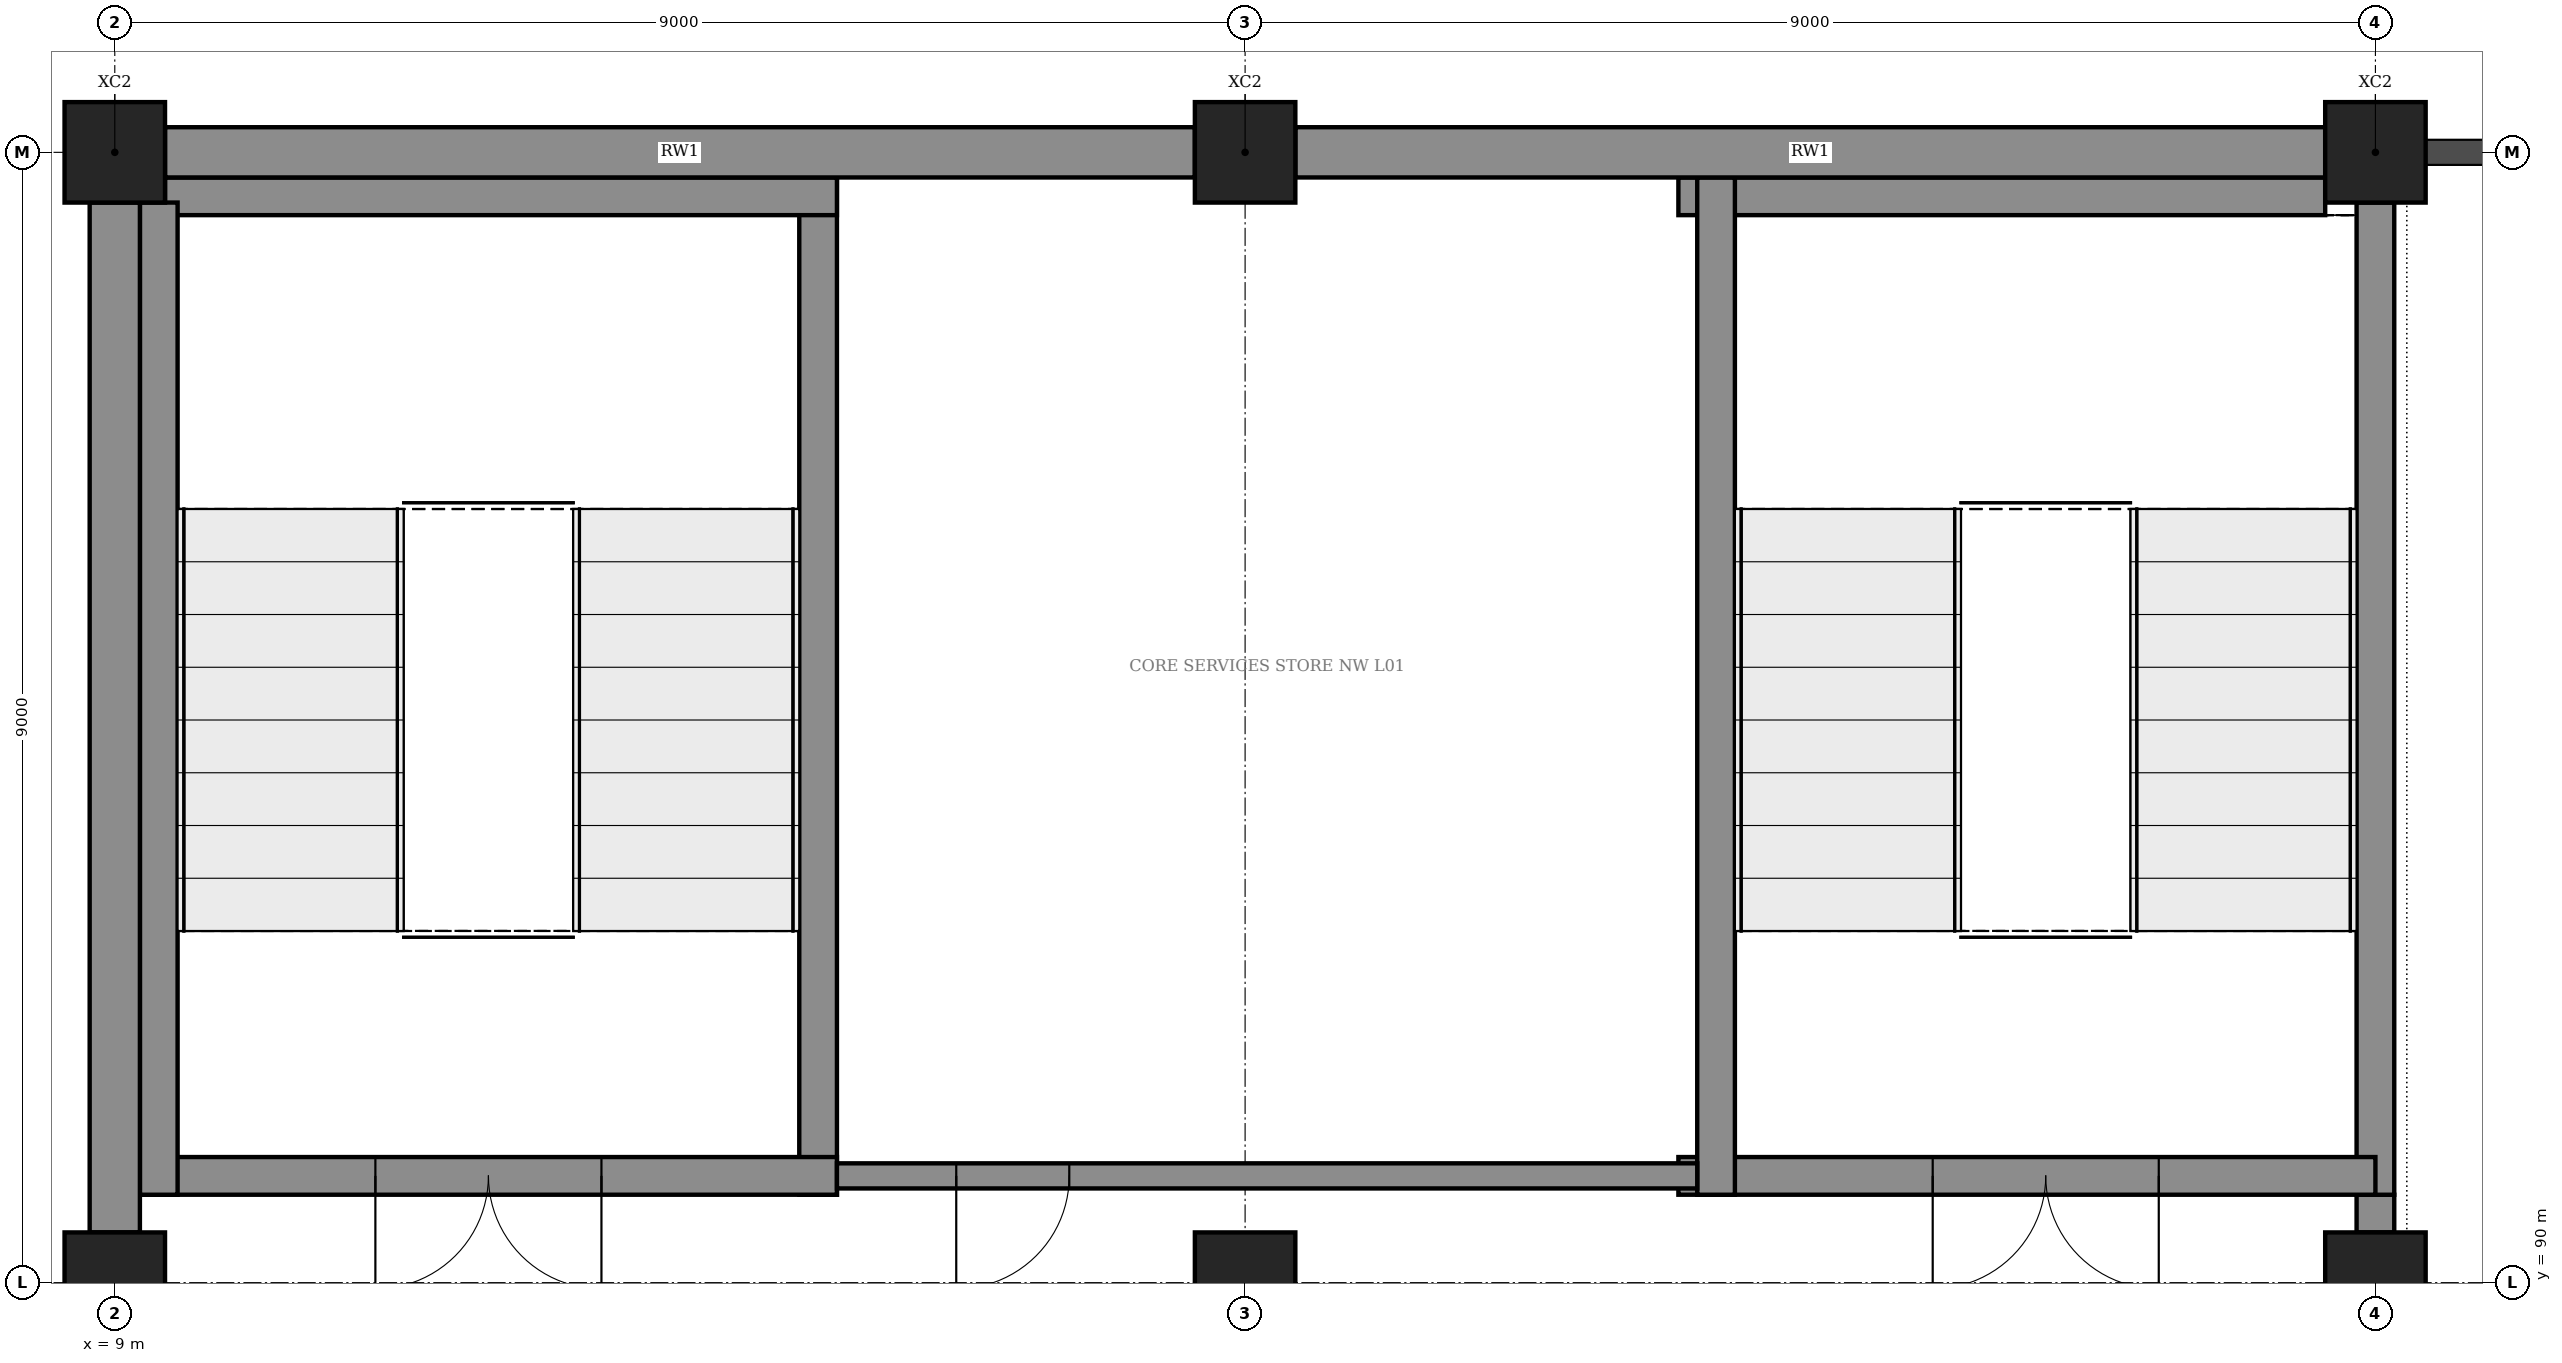
"""IFC4 building model, lengths in metres.
Left out: names, types, materials, properties, quantities, classifications, styles, units other than length and angle.
Written with IfcOpenShell. Run it as: python <this file> out.ifc"""

import sys

from ifc_helpers import new_model, si_unit, direction, frame, frame_2d, origin, origin_2d, place, context, subcontext, project, spatial, rectangle, extrude, element, fill, save


model = new_model("IFC4")
c1 = context("Model", 3, precision=1e-05, world=origin(), true_north=direction((0.0, 1.0)))
c2 = subcontext(c1, "Body", "Model", "MODEL_VIEW")
j1 = project(units=[si_unit("LENGTHUNIT", "METRE"), si_unit("PLANEANGLEUNIT", "RADIAN")], contexts=[c1])
p1 = place(None, origin())
s1 = spatial("IfcSite", under=j1, at=p1, CompositionType="ELEMENT")
p2 = place(p1, origin())
s2 = spatial("IfcBuilding", under=s1, at=p2, CompositionType="ELEMENT")
p3 = place(p2, frame((0.0, 0.0, 6.0)))
s3 = spatial("IfcBuildingStorey", under=s2, at=p3, CompositionType="ELEMENT", Elevation=6.0)
for number, where, z_axis, x_axis in (
    (1, (9.0, 90.0, 0.0), (0.0, 0.0, 1.0), (1.0, 0.0, 0.0)),
    (2, (9.0, 99.0, 0.0), (0.0, 0.0, 1.0), (1.0, 0.0, 0.0)),
    (3, (18.0, 90.0, 0.0), (0.0, 0.0, 1.0), (1.0, 0.0, 0.0)),
    (4, (18.0, 99.0, 0.0), (0.0, 0.0, 1.0), (1.0, 0.0, 0.0)),
    (5, (27.0, 90.0, 0.0), (0.0, 0.0, 1.0), (1.0, 0.0, 0.0)),
    (6, (27.0, 99.0, 0.0), (0.0, 0.0, 1.0), (1.0, 0.0, 0.0)),
):
    element("IfcColumn", number, at=place(p3, frame(where, z_axis=z_axis, x_axis=x_axis)), inside=s3, PredefinedType="COLUMN", context=c2, shape_type="SweptSolid", body=[
        extrude(rectangle(XDim=0.8, YDim=0.8, at=origin_2d()), origin(), (0.0, 0.0, 1.0), 5.5),
    ])
for number, where, z_axis, x_axis in (
    (7, (9.4, 99.0, 0.0), (0.0, 0.0, 1.0), (1.0, 0.0, 0.0)),
    (8, (18.4, 99.0, 0.0), (0.0, 0.0, 1.0), (1.0, 0.0, 0.0)),
    (9, (9.0, 90.4, 0.0), (0.0, 0.0, 1.0), (0.0, 1.0, 0.0)),
):
    element("IfcWall", number, at=place(p3, frame(where, z_axis=z_axis, x_axis=x_axis)), inside=s3, PredefinedType="SOLIDWALL", context=c2, shape_type="SweptSolid", body=[
        extrude(rectangle(XDim=8.2, YDim=0.4, at=frame_2d((4.1, 0.0))), origin(), (0.0, 0.0, 1.0), 4.32),
    ])
p4 = place(p3, frame((9.4, 98.65, 0.0), z_axis=(0.0, 0.0, 1.0), x_axis=(1.0, 0.0, 0.0)))
e10 = element("IfcWall", 10, at=p4, inside=s3, PredefinedType="SOLIDWALL", context=c2, shape_type="SweptSolid", body=[
    extrude(rectangle(XDim=5.35, YDim=0.3, at=frame_2d((2.675, 0.0))), origin(), (0.0, 0.0, 1.0), 5.22),
])
p5 = place(p3, frame((9.2, 90.85, 0.0), z_axis=(0.0, 0.0, 1.0), x_axis=(1.0, 0.0, 0.0)))
e11 = element("IfcWall", 11, at=p5, inside=s3, PredefinedType="SOLIDWALL", context=c2, shape_type="SweptSolid", body=[
    extrude(rectangle(XDim=5.55, YDim=0.3, at=frame_2d((2.775, 0.0))), origin(), (0.0, 0.0, 1.0), 5.22),
])
p6 = place(p5, frame((1.875, 0.0, 0.0)))
e12 = element("IfcOpeningElement", 12, at=p6, cuts=e11, PredefinedType="OPENING", context=c2, shape_type="SweptSolid", body=[
    extrude(rectangle(XDim=1.8, YDim=2.4, at=frame_2d((0.9, 1.2))), frame((0.0, 0.16, 0.0), z_axis=(0.0, -1.0, 0.0), x_axis=(1.0, 0.0, 0.0)), (0.0, 0.0, 1.0), 0.32),
])
p7 = place(p3, frame((9.35, 98.6, 0.0), z_axis=(0.0, 0.0, 1.0), x_axis=(0.0, -1.0, 0.0)))
e13 = element("IfcWall", 13, at=p7, inside=s3, PredefinedType="SOLIDWALL", context=c2, shape_type="SweptSolid", body=[
    extrude(rectangle(XDim=7.9, YDim=0.3, at=frame_2d((3.95, 0.0))), origin(), (0.0, 0.0, 1.0), 5.22),
])
p8 = place(p3, frame((14.6, 98.8, 0.0), z_axis=(0.0, 0.0, 1.0), x_axis=(0.0, -1.0, 0.0)))
e14 = element("IfcWall", 14, at=p8, inside=s3, PredefinedType="SOLIDWALL", context=c2, shape_type="SweptSolid", body=[
    extrude(rectangle(XDim=8.1, YDim=0.3, at=frame_2d((4.05, 0.0))), origin(), (0.0, 0.0, 1.0), 5.22),
])
p9 = place(p3, frame((21.45, 98.65, 0.0), z_axis=(0.0, 0.0, 1.0), x_axis=(1.0, 0.0, 0.0)))
e15 = element("IfcWall", 15, at=p9, inside=s3, PredefinedType="SOLIDWALL", context=c2, shape_type="SweptSolid", body=[
    extrude(rectangle(XDim=5.15, YDim=0.3, at=frame_2d((2.575, 0.0))), origin(), (0.0, 0.0, 1.0), 5.22),
])
p10 = place(p3, frame((21.45, 90.85, 0.0), z_axis=(0.0, 0.0, 1.0), x_axis=(1.0, 0.0, 0.0)))
e16 = element("IfcWall", 16, at=p10, inside=s3, PredefinedType="SOLIDWALL", context=c2, shape_type="SweptSolid", body=[
    extrude(rectangle(XDim=5.55, YDim=0.3, at=frame_2d((2.775, 0.0))), origin(), (0.0, 0.0, 1.0), 5.22),
])
p11 = place(p10, frame((2.025, 0.0, 0.0)))
e17 = element("IfcOpeningElement", 17, at=p11, cuts=e16, PredefinedType="OPENING", context=c2, shape_type="SweptSolid", body=[
    extrude(rectangle(XDim=1.8, YDim=2.4, at=frame_2d((0.9, 1.2))), frame((0.0, 0.16, 0.0), z_axis=(0.0, -1.0, 0.0), x_axis=(1.0, 0.0, 0.0)), (0.0, 0.0, 1.0), 0.32),
])
p12 = place(p3, frame((21.75, 98.8, 0.0), z_axis=(0.0, 0.0, 1.0), x_axis=(0.0, -1.0, 0.0)))
e18 = element("IfcWall", 18, at=p12, inside=s3, PredefinedType="SOLIDWALL", context=c2, shape_type="SweptSolid", body=[
    extrude(rectangle(XDim=8.1, YDim=0.3, at=frame_2d((4.05, 0.0))), origin(), (0.0, 0.0, 1.0), 5.22),
])
p13 = place(p3, frame((27.0, 98.6, 0.0), z_axis=(0.0, 0.0, 1.0), x_axis=(0.0, -1.0, 0.0)))
e19 = element("IfcWall", 19, at=p13, inside=s3, PredefinedType="SOLIDWALL", context=c2, shape_type="SweptSolid", body=[
    extrude(rectangle(XDim=7.9, YDim=0.3, at=frame_2d((3.95, 0.0))), origin(), (0.0, 0.0, 1.0), 5.22),
])
p14 = place(p3, frame((14.75, 90.85, 0.0), z_axis=(0.0, 0.0, 1.0), x_axis=(1.0, 0.0, 0.0)))
e20 = element("IfcWall", 20, at=p14, inside=s3, PredefinedType="PARTITIONING", context=c2, shape_type="SweptSolid", body=[
    extrude(rectangle(XDim=6.85, YDim=0.2, at=frame_2d((3.425, 0.0))), origin(), (0.0, 0.0, 1.0), 5.22),
])
p15 = place(p14, frame((0.95, 0.0, 0.0)))
e21 = element("IfcOpeningElement", 21, at=p15, cuts=e20, PredefinedType="OPENING", context=c2, shape_type="SweptSolid", body=[
    extrude(rectangle(XDim=0.9, YDim=2.1, at=frame_2d((0.45, 1.05))), frame((0.0, 0.11, 0.0), z_axis=(0.0, -1.0, 0.0), x_axis=(1.0, 0.0, 0.0)), (0.0, 0.0, 1.0), 0.22),
])
p16 = place(p3, frame((27.0, 90.7, 0.0), z_axis=(0.0, 0.0, 1.0), x_axis=(0.0, -1.0, 0.0)))
e22 = element("IfcWall", 22, at=p16, inside=s3, PredefinedType="SOLIDWALL", context=c2, shape_type="SweptSolid", body=[
    extrude(rectangle(XDim=0.3, YDim=0.3, at=frame_2d((0.15, 0.0))), origin(), (0.0, 0.0, 1.0), 4.32),
])
p17 = place(p6, frame((1.8, 0.0, 0.0), z_axis=(0.0, 0.0, 1.0), x_axis=(-1.0, 0.0, 0.0)))
e23 = element("IfcDoor", 23, at=p17, inside=s3, OperationType="DOUBLE_DOOR_SINGLE_SWING", PredefinedType="DOOR", context=c2, shape_type="SweptSolid", body=[
    extrude(rectangle(XDim=1.8, YDim=2.4, at=frame_2d((0.9, 1.2))), frame((0.0, 0.025, 0.0), z_axis=(0.0, -1.0, 0.0), x_axis=(1.0, 0.0, 0.0)), (0.0, 0.0, 1.0), 0.05),
])
fill(e12, e23)
p18 = place(p11, frame((1.8, 0.0, 0.0), z_axis=(0.0, 0.0, 1.0), x_axis=(-1.0, 0.0, 0.0)))
e24 = element("IfcDoor", 24, at=p18, inside=s3, OperationType="DOUBLE_DOOR_SINGLE_SWING", PredefinedType="DOOR", context=c2, shape_type="SweptSolid", body=[
    extrude(rectangle(XDim=1.8, YDim=2.4, at=frame_2d((0.9, 1.2))), frame((0.0, 0.025, 0.0), z_axis=(0.0, -1.0, 0.0), x_axis=(1.0, 0.0, 0.0)), (0.0, 0.0, 1.0), 0.05),
])
fill(e17, e24)
p19 = place(p15, frame((0.9, 0.0, 0.0), z_axis=(0.0, 0.0, 1.0), x_axis=(-1.0, 0.0, 0.0)))
e25 = element("IfcDoor", 25, at=p19, inside=s3, OperationType="SINGLE_SWING_LEFT", PredefinedType="DOOR", context=c2, shape_type="SweptSolid", body=[
    extrude(rectangle(XDim=0.9, YDim=2.1, at=frame_2d((0.45, 1.05))), frame((0.0, 0.025, 0.0), z_axis=(0.0, -1.0, 0.0), x_axis=(1.0, 0.0, 0.0)), (0.0, 0.0, 1.0), 0.05),
])
fill(e21, e25)
save(model, sys.argv[1])
